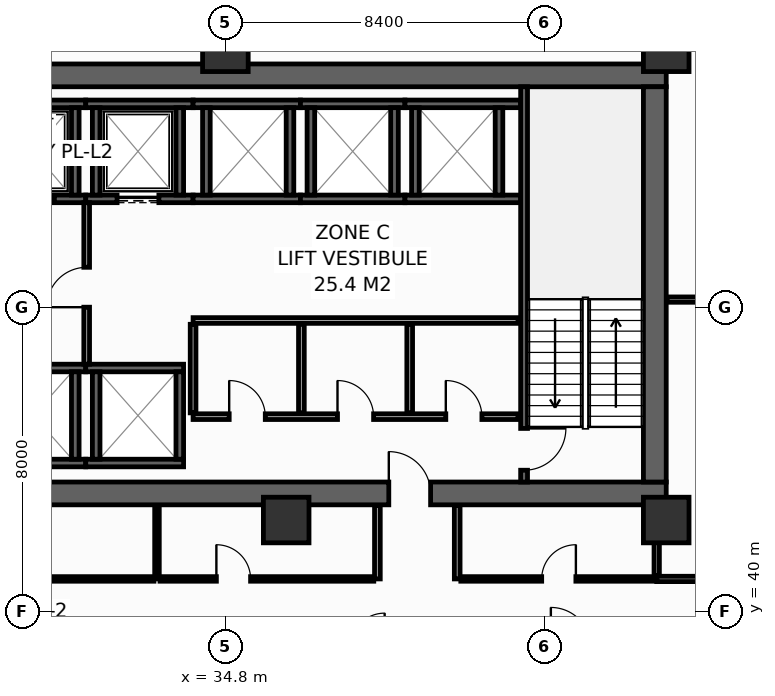
"""IFC4 building model, lengths in metres.
Left out: names, types, materials, properties, quantities, classifications, styles, units other than length and angle.
Written with IfcOpenShell. Run it as: python <this file> out.ifc"""

import sys

from ifc_helpers import new_model, si_unit, direction, frame, frame_2d, origin, origin_2d, place, context, subcontext, project, spatial, rectangle, hollow_rectangle, extrude, element, fill, save


model = new_model("IFC4")
c1 = context("Model", 3, precision=1e-05, world=origin(), true_north=direction((0.0, 1.0)))
c2 = subcontext(c1, "Body", "Model", "MODEL_VIEW")
j1 = project(units=[si_unit("LENGTHUNIT", "METRE"), si_unit("PLANEANGLEUNIT", "RADIAN")], contexts=[c1])
p1 = place(None, origin())
s1 = spatial("IfcSite", under=j1, at=p1, CompositionType="ELEMENT")
p2 = place(p1, origin())
s2 = spatial("IfcBuilding", under=s1, at=p2, CompositionType="ELEMENT")
p3 = place(p2, frame((0.0, 0.0, 73.6)))
s3 = spatial("IfcBuildingStorey", under=s2, at=p3, CompositionType="ELEMENT", Elevation=73.6)
p4 = place(p3, frame((13.5, 43.1, 0.0), z_axis=(0.0, 0.0, 1.0), x_axis=(1.0, 0.0, 0.0)))
e1 = element("IfcWall", 1, at=p4, inside=s3, PredefinedType="SHEAR", context=c2, shape_type="SweptSolid", body=[
    extrude(rectangle(XDim=32.9, YDim=0.6, at=frame_2d((16.45, 0.0))), origin(), (0.0, 0.0, 1.0), 4.15),
])
p5 = place(p4, frame((5.4, 0.0, 0.0)))
e2 = element("IfcOpeningElement", 2, at=p5, cuts=e1, PredefinedType="OPENING", context=c2, shape_type="SweptSolid", body=[
    extrude(rectangle(XDim=1.1, YDim=2.15, at=frame_2d((0.55, 1.075))), frame((0.0, 0.31, 0.0), z_axis=(0.0, -1.0, 0.0), x_axis=(1.0, 0.0, 0.0)), (0.0, 0.0, 1.0), 0.62),
])
p6 = place(p4, frame((25.6, 0.0, 0.0)))
e3 = element("IfcOpeningElement", 3, at=p6, cuts=e1, PredefinedType="OPENING", context=c2, shape_type="SweptSolid", body=[
    extrude(rectangle(XDim=1.1, YDim=2.15, at=frame_2d((0.55, 1.075))), frame((0.0, 0.31, 0.0), z_axis=(0.0, -1.0, 0.0), x_axis=(1.0, 0.0, 0.0)), (0.0, 0.0, 1.0), 0.62),
])
p7 = place(p3, frame((13.5, 54.1, 0.0), z_axis=(0.0, 0.0, 1.0), x_axis=(1.0, 0.0, 0.0)))
e4 = element("IfcWall", 4, at=p7, inside=s3, PredefinedType="SHEAR", context=c2, shape_type="SweptSolid", body=[
    extrude(rectangle(XDim=32.9, YDim=0.6, at=frame_2d((16.45, 0.0))), origin(), (0.0, 0.0, 1.0), 4.15),
])
p8 = place(p3, frame((46.1, 43.4, 0.0), z_axis=(0.0, 0.0, 1.0), x_axis=(0.0, 1.0, 0.0)))
e5 = element("IfcWall", 5, at=p8, inside=s3, PredefinedType="SHEAR", context=c2, shape_type="SweptSolid", body=[
    extrude(rectangle(XDim=10.4, YDim=0.6, at=frame_2d((5.2, 0.0))), origin(), (0.0, 0.0, 1.0), 4.15),
])
for number, where, z_axis, x_axis in (
    (6, (34.8, 54.8, 0.0), (0.0, 0.0, 1.0), (1.0, 0.0, 0.0)),
    (7, (46.4, 54.8, 0.0), (0.0, 0.0, 1.0), (1.0, 0.0, 0.0)),
    (8, (36.4, 42.4, 0.0), (0.0, 0.0, 1.0), (1.0, 0.0, 0.0)),
    (9, (46.4, 42.4, 0.0), (0.0, 0.0, 1.0), (1.0, 0.0, 0.0)),
):
    element("IfcColumn", number, at=place(p3, frame(where, z_axis=z_axis, x_axis=x_axis)), inside=s3, PredefinedType="COLUMN", context=c2, shape_type="SweptSolid", body=[
        extrude(hollow_rectangle(XDim=1.2, YDim=1.2, WallThickness=0.055, at=origin_2d()), origin(), (0.0, 0.0, 1.0), 4.4),
    ])
p9 = place(p3, frame((28.375, 50.85, 0.0), z_axis=(0.0, 0.0, 1.0), x_axis=(1.0, 0.0, 0.0)))
e10 = element("IfcWall", 10, at=p9, inside=s3, PredefinedType="SHEAR", context=c2, shape_type="SweptSolid", body=[
    extrude(rectangle(XDim=2.75, YDim=0.2, at=frame_2d((1.375, 0.0))), origin(), (0.0, 0.0, 1.0), 4.15),
])
p10 = place(p9, frame((0.825, 0.0, 0.0)))
e11 = element("IfcOpeningElement", 11, at=p10, cuts=e10, PredefinedType="OPENING", context=c2, shape_type="SweptSolid", body=[
    extrude(rectangle(XDim=1.1, YDim=2.2, at=frame_2d((0.55, 1.1))), frame((0.0, 0.11, 0.0), z_axis=(0.0, -1.0, 0.0), x_axis=(1.0, 0.0, 0.0)), (0.0, 0.0, 1.0), 0.22),
])
p11 = place(p3, frame((28.375, 53.35, 0.0), z_axis=(0.0, 0.0, 1.0), x_axis=(1.0, 0.0, 0.0)))
e12 = element("IfcWall", 12, at=p11, inside=s3, PredefinedType="SHEAR", context=c2, shape_type="SweptSolid", body=[
    extrude(rectangle(XDim=2.75, YDim=0.2, at=frame_2d((1.375, 0.0))), origin(), (0.0, 0.0, 1.0), 4.15),
])
p12 = place(p3, frame((30.85, 50.95, 0.0), z_axis=(0.0, 0.0, 1.0), x_axis=(0.0, 1.0, 0.0)))
e13 = element("IfcWall", 13, at=p12, inside=s3, PredefinedType="SHEAR", context=c2, shape_type="SweptSolid", body=[
    extrude(rectangle(XDim=2.3, YDim=0.2, at=frame_2d((1.15, 0.0))), origin(), (0.0, 0.0, 1.0), 4.15),
])
p13 = place(p3, frame((31.125, 50.85, 0.0), z_axis=(0.0, 0.0, 1.0), x_axis=(1.0, 0.0, 0.0)))
e14 = element("IfcWall", 14, at=p13, inside=s3, PredefinedType="SHEAR", context=c2, shape_type="SweptSolid", body=[
    extrude(rectangle(XDim=2.825, YDim=0.2, at=frame_2d((1.413, 0.0))), origin(), (0.0, 0.0, 1.0), 4.15),
])
p14 = place(p13, frame((0.825, 0.0, 0.0)))
e15 = element("IfcOpeningElement", 15, at=p14, cuts=e14, PredefinedType="OPENING", context=c2, shape_type="SweptSolid", body=[
    extrude(rectangle(XDim=1.1, YDim=2.2, at=frame_2d((0.55, 1.1))), frame((0.0, 0.11, 0.0), z_axis=(0.0, -1.0, 0.0), x_axis=(1.0, 0.0, 0.0)), (0.0, 0.0, 1.0), 0.22),
])
p15 = place(p3, frame((31.125, 53.35, 0.0), z_axis=(0.0, 0.0, 1.0), x_axis=(1.0, 0.0, 0.0)))
e16 = element("IfcWall", 16, at=p15, inside=s3, PredefinedType="SHEAR", context=c2, shape_type="SweptSolid", body=[
    extrude(rectangle(XDim=2.825, YDim=0.2, at=frame_2d((1.413, 0.0))), origin(), (0.0, 0.0, 1.0), 4.15),
])
for number, where, z_axis, x_axis in (
    (17, (31.4, 50.95, 0.0), (0.0, 0.0, 1.0), (0.0, 1.0, 0.0)),
    (18, (33.6, 50.95, 0.0), (0.0, 0.0, 1.0), (0.0, 1.0, 0.0)),
):
    element("IfcWall", number, at=place(p3, frame(where, z_axis=z_axis, x_axis=x_axis)), inside=s3, PredefinedType="SHEAR", context=c2, shape_type="SweptSolid", body=[
        extrude(rectangle(XDim=2.3, YDim=0.2, at=frame_2d((1.15, 0.0))), origin(), (0.0, 0.0, 1.0), 4.15),
    ])
for number, where, z_axis, x_axis in (
    (19, (28.375, 43.9, 0.0), (0.0, 0.0, 1.0), (1.0, 0.0, 0.0)),
    (20, (28.375, 46.4, 0.0), (0.0, 0.0, 1.0), (1.0, 0.0, 0.0)),
):
    element("IfcWall", number, at=place(p3, frame(where, z_axis=z_axis, x_axis=x_axis)), inside=s3, PredefinedType="SHEAR", context=c2, shape_type="SweptSolid", body=[
        extrude(rectangle(XDim=2.75, YDim=0.2, at=frame_2d((1.375, 0.0))), origin(), (0.0, 0.0, 1.0), 4.15),
    ])
p16 = place(p3, frame((30.85, 44.0, 0.0), z_axis=(0.0, 0.0, 1.0), x_axis=(0.0, 1.0, 0.0)))
e21 = element("IfcWall", 21, at=p16, inside=s3, PredefinedType="SHEAR", context=c2, shape_type="SweptSolid", body=[
    extrude(rectangle(XDim=2.3, YDim=0.2, at=frame_2d((1.15, 0.0))), origin(), (0.0, 0.0, 1.0), 4.15),
])
for number, where, z_axis, x_axis in (
    (22, (31.125, 43.9, 0.0), (0.0, 0.0, 1.0), (1.0, 0.0, 0.0)),
    (23, (31.125, 46.4, 0.0), (0.0, 0.0, 1.0), (1.0, 0.0, 0.0)),
):
    element("IfcWall", number, at=place(p3, frame(where, z_axis=z_axis, x_axis=x_axis)), inside=s3, PredefinedType="SHEAR", context=c2, shape_type="SweptSolid", body=[
        extrude(rectangle(XDim=2.575, YDim=0.2, at=frame_2d((1.288, 0.0))), origin(), (0.0, 0.0, 1.0), 4.15),
    ])
for number, where, z_axis, x_axis in (
    (24, (31.4, 44.0, 0.0), (0.0, 0.0, 1.0), (0.0, 1.0, 0.0)),
    (25, (33.6, 44.0, 0.0), (0.0, 0.0, 1.0), (0.0, 1.0, 0.0)),
):
    element("IfcWall", number, at=place(p3, frame(where, z_axis=z_axis, x_axis=x_axis)), inside=s3, PredefinedType="SHEAR", context=c2, shape_type="SweptSolid", body=[
        extrude(rectangle(XDim=2.3, YDim=0.2, at=frame_2d((1.15, 0.0))), origin(), (0.0, 0.0, 1.0), 4.15),
    ])
for number, where, z_axis, x_axis in (
    (26, (33.95, 50.85, 0.0), (0.0, 0.0, 1.0), (1.0, 0.0, 0.0)),
    (27, (33.95, 53.35, 0.0), (0.0, 0.0, 1.0), (1.0, 0.0, 0.0)),
):
    element("IfcWall", number, at=place(p3, frame(where, z_axis=z_axis, x_axis=x_axis)), inside=s3, PredefinedType="SHEAR", context=c2, shape_type="SweptSolid", body=[
        extrude(rectangle(XDim=2.825, YDim=0.2, at=frame_2d((1.413, 0.0))), origin(), (0.0, 0.0, 1.0), 4.15),
    ])
for number, where, z_axis, x_axis in (
    (28, (34.3, 50.95, 0.0), (0.0, 0.0, 1.0), (0.0, 1.0, 0.0)),
    (29, (36.5, 50.95, 0.0), (0.0, 0.0, 1.0), (0.0, 1.0, 0.0)),
):
    element("IfcWall", number, at=place(p3, frame(where, z_axis=z_axis, x_axis=x_axis)), inside=s3, PredefinedType="SHEAR", context=c2, shape_type="SweptSolid", body=[
        extrude(rectangle(XDim=2.3, YDim=0.2, at=frame_2d((1.15, 0.0))), origin(), (0.0, 0.0, 1.0), 4.15),
    ])
for number, where, z_axis, x_axis in (
    (30, (36.775, 50.85, 0.0), (0.0, 0.0, 1.0), (1.0, 0.0, 0.0)),
    (31, (36.775, 53.35, 0.0), (0.0, 0.0, 1.0), (1.0, 0.0, 0.0)),
):
    element("IfcWall", number, at=place(p3, frame(where, z_axis=z_axis, x_axis=x_axis)), inside=s3, PredefinedType="SHEAR", context=c2, shape_type="SweptSolid", body=[
        extrude(rectangle(XDim=2.75, YDim=0.2, at=frame_2d((1.375, 0.0))), origin(), (0.0, 0.0, 1.0), 4.15),
    ])
for number, where, z_axis, x_axis in (
    (32, (37.05, 50.95, 0.0), (0.0, 0.0, 1.0), (0.0, 1.0, 0.0)),
    (33, (39.25, 50.95, 0.0), (0.0, 0.0, 1.0), (0.0, 1.0, 0.0)),
):
    element("IfcWall", number, at=place(p3, frame(where, z_axis=z_axis, x_axis=x_axis)), inside=s3, PredefinedType="SHEAR", context=c2, shape_type="SweptSolid", body=[
        extrude(rectangle(XDim=2.3, YDim=0.2, at=frame_2d((1.15, 0.0))), origin(), (0.0, 0.0, 1.0), 4.15),
    ])
for number, where, z_axis, x_axis in (
    (34, (39.525, 50.85, 0.0), (0.0, 0.0, 1.0), (1.0, 0.0, 0.0)),
    (35, (39.525, 53.35, 0.0), (0.0, 0.0, 1.0), (1.0, 0.0, 0.0)),
):
    element("IfcWall", number, at=place(p3, frame(where, z_axis=z_axis, x_axis=x_axis)), inside=s3, PredefinedType="SHEAR", context=c2, shape_type="SweptSolid", body=[
        extrude(rectangle(XDim=3.045, YDim=0.2, at=frame_2d((1.522, 0.0))), origin(), (0.0, 0.0, 1.0), 4.15),
    ])
for number, where, z_axis, x_axis in (
    (36, (39.8, 50.95, 0.0), (0.0, 0.0, 1.0), (0.0, 1.0, 0.0)),
    (37, (42.0, 50.95, 0.0), (0.0, 0.0, 1.0), (0.0, 1.0, 0.0)),
):
    element("IfcWall", number, at=place(p3, frame(where, z_axis=z_axis, x_axis=x_axis)), inside=s3, PredefinedType="SHEAR", context=c2, shape_type="SweptSolid", body=[
        extrude(rectangle(XDim=2.3, YDim=0.2, at=frame_2d((1.15, 0.0))), origin(), (0.0, 0.0, 1.0), 4.15),
    ])
p17 = place(p3, frame((42.66, 53.8, 0.0), z_axis=(0.0, 0.0, 1.0), x_axis=(0.0, -1.0, 0.0)))
e38 = element("IfcWall", 38, at=p17, inside=s3, PredefinedType="SHEAR", context=c2, shape_type="SweptSolid", body=[
    extrude(rectangle(XDim=10.4, YDim=0.18, at=frame_2d((5.2, 0.0))), origin(), (0.0, 0.0, 1.0), 4.15),
])
p18 = place(p17, frame((8.99, 0.0, 0.0)))
e39 = element("IfcOpeningElement", 39, at=p18, cuts=e38, PredefinedType="OPENING", context=c2, shape_type="SweptSolid", body=[
    extrude(rectangle(XDim=1.1, YDim=2.15, at=frame_2d((0.55, 1.075))), frame((0.0, 0.1, 0.0), z_axis=(0.0, -1.0, 0.0), x_axis=(1.0, 0.0, 0.0)), (0.0, 0.0, 1.0), 0.2),
])
p19 = place(p3, frame((31.15, 46.5, 0.0), z_axis=(0.0, 0.0, 1.0), x_axis=(0.0, 1.0, 0.0)))
e40 = element("IfcWall", 40, at=p19, inside=s3, PredefinedType="PARTITIONING", context=c2, shape_type="SweptSolid", body=[
    extrude(rectangle(XDim=4.25, YDim=0.15, at=frame_2d((2.125, 0.0))), origin(), (0.0, 0.0, 1.0), 4.15),
])
p20 = place(p19, frame((1.5, 0.0, 0.0)))
e41 = element("IfcOpeningElement", 41, at=p20, cuts=e40, PredefinedType="OPENING", context=c2, shape_type="SweptSolid", body=[
    extrude(rectangle(XDim=1.05, YDim=2.15, at=frame_2d((0.525, 1.075))), frame((0.0, 0.085, 0.0), z_axis=(0.0, -1.0, 0.0), x_axis=(1.0, 0.0, 0.0)), (0.0, 0.0, 1.0), 0.17),
])
p21 = place(p3, frame((33.95, 45.12, 0.0), z_axis=(0.0, 0.0, 1.0), x_axis=(1.0, 0.0, 0.0)))
e42 = element("IfcWall", 42, at=p21, inside=s3, PredefinedType="PARTITIONING", context=c2, shape_type="SweptSolid", body=[
    extrude(rectangle(XDim=8.55, YDim=0.15, at=frame_2d((4.275, 0.0))), origin(), (0.0, 0.0, 1.0), 4.15),
])
p22 = place(p21, frame((0.95, 0.0, 0.0)))
e43 = element("IfcOpeningElement", 43, at=p22, cuts=e42, PredefinedType="OPENING", context=c2, shape_type="SweptSolid", body=[
    extrude(rectangle(XDim=0.95, YDim=2.15, at=frame_2d((0.475, 1.075))), frame((0.0, 0.085, 0.0), z_axis=(0.0, -1.0, 0.0), x_axis=(1.0, 0.0, 0.0)), (0.0, 0.0, 1.0), 0.17),
])
p23 = place(p21, frame((3.8, 0.0, 0.0)))
e44 = element("IfcOpeningElement", 44, at=p23, cuts=e42, PredefinedType="OPENING", context=c2, shape_type="SweptSolid", body=[
    extrude(rectangle(XDim=0.95, YDim=2.15, at=frame_2d((0.475, 1.075))), frame((0.0, 0.085, 0.0), z_axis=(0.0, -1.0, 0.0), x_axis=(1.0, 0.0, 0.0)), (0.0, 0.0, 1.0), 0.17),
])
p24 = place(p21, frame((6.65, 0.0, 0.0)))
e45 = element("IfcOpeningElement", 45, at=p24, cuts=e42, PredefinedType="OPENING", context=c2, shape_type="SweptSolid", body=[
    extrude(rectangle(XDim=0.95, YDim=2.15, at=frame_2d((0.475, 1.075))), frame((0.0, 0.085, 0.0), z_axis=(0.0, -1.0, 0.0), x_axis=(1.0, 0.0, 0.0)), (0.0, 0.0, 1.0), 0.17),
])
p25 = place(p3, frame((33.95, 47.65, 0.0), z_axis=(0.0, 0.0, 1.0), x_axis=(1.0, 0.0, 0.0)))
e46 = element("IfcWall", 46, at=p25, inside=s3, PredefinedType="PARTITIONING", context=c2, shape_type="SweptSolid", body=[
    extrude(rectangle(XDim=8.55, YDim=0.15, at=frame_2d((4.275, 0.0))), origin(), (0.0, 0.0, 1.0), 4.15),
])
for number, where, z_axis, x_axis in (
    (47, (33.95, 45.22, 0.0), (0.0, 0.0, 1.0), (0.0, 1.0, 0.0)),
    (48, (36.8, 45.22, 0.0), (0.0, 0.0, 1.0), (0.0, 1.0, 0.0)),
    (49, (39.65, 45.22, 0.0), (0.0, 0.0, 1.0), (0.0, 1.0, 0.0)),
):
    element("IfcWall", number, at=place(p3, frame(where, z_axis=z_axis, x_axis=x_axis)), inside=s3, PredefinedType="PARTITIONING", context=c2, shape_type="SweptSolid", body=[
        extrude(rectangle(XDim=2.33, YDim=0.15, at=frame_2d((1.165, 0.0))), origin(), (0.0, 0.0, 1.0), 4.15),
    ])
p26 = place(p3, frame((46.15, 40.85, 0.0), z_axis=(0.0, 0.0, 1.0), x_axis=(1.0, 0.0, 0.0)))
e50 = element("IfcWall", 50, at=p26, inside=s3, PredefinedType="PARTITIONING", context=c2, shape_type="SweptSolid", body=[
    extrude(rectangle(XDim=4.05, YDim=0.14, at=frame_2d((2.025, 0.0))), origin(), (0.0, 0.0, 1.0), 4.15),
])
p27 = place(p3, frame((46.15, 40.94, 0.0), z_axis=(0.0, 0.0, 1.0), x_axis=(0.0, 1.0, 0.0)))
e51 = element("IfcWall", 51, at=p27, inside=s3, PredefinedType="PARTITIONING", context=c2, shape_type="SweptSolid", body=[
    extrude(rectangle(XDim=1.84, YDim=0.14, at=frame_2d((0.92, 0.0))), origin(), (0.0, 0.0, 1.0), 4.15),
])
p28 = place(p3, frame((46.42, 48.2, 0.0), z_axis=(0.0, 0.0, 1.0), x_axis=(1.0, 0.0, 0.0)))
e52 = element("IfcWall", 52, at=p28, inside=s3, PredefinedType="PARTITIONING", context=c2, shape_type="SweptSolid", body=[
    extrude(rectangle(XDim=3.78, YDim=0.14, at=frame_2d((1.89, 0.0))), origin(), (0.0, 0.0, 1.0), 4.15),
])
for number, where, z_axis, x_axis in (
    (53, (38.8, 40.85, 0.0), (0.0, 0.0, 1.0), (0.0, 1.0, 0.0)),
    (54, (40.9, 40.85, 0.0), (0.0, 0.0, 1.0), (0.0, 1.0, 0.0)),
):
    element("IfcWall", number, at=place(p3, frame(where, z_axis=z_axis, x_axis=x_axis)), inside=s3, PredefinedType="PARTITIONING", context=c2, shape_type="SweptSolid", body=[
        extrude(rectangle(XDim=1.93, YDim=0.15, at=frame_2d((0.965, 0.0))), origin(), (0.0, 0.0, 1.0), 4.15),
    ])
p29 = place(p3, frame((33.0, 40.85, 0.0), z_axis=(0.0, 0.0, 1.0), x_axis=(0.0, 1.0, 0.0)))
e55 = element("IfcWall", 55, at=p29, inside=s3, PredefinedType="PARTITIONING", context=c2, shape_type="SweptSolid", body=[
    extrude(rectangle(XDim=1.93, YDim=0.12, at=frame_2d((0.965, 0.0))), origin(), (0.0, 0.0, 1.0), 3.335),
])
p30 = place(p3, frame((20.795, 40.85, 0.0), z_axis=(0.0, 0.0, 1.0), x_axis=(1.0, 0.0, 0.0)))
e56 = element("IfcWall", 56, at=p30, inside=s3, PredefinedType="PARTITIONING", context=c2, shape_type="SweptSolid", body=[
    extrude(rectangle(XDim=12.125, YDim=0.12, at=frame_2d((6.062, 0.0))), origin(), (0.0, 0.0, 1.0), 3.335),
])
p31 = place(p30, frame((5.612, 0.0, 0.0)))
e57 = element("IfcOpeningElement", 57, at=p31, cuts=e56, PredefinedType="OPENING", context=c2, shape_type="SweptSolid", body=[
    extrude(rectangle(XDim=0.9, YDim=2.1, at=frame_2d((0.45, 1.05))), frame((0.0, 0.07, 0.0), z_axis=(0.0, -1.0, 0.0), x_axis=(1.0, 0.0, 0.0)), (0.0, 0.0, 1.0), 0.14),
])
p32 = place(p3, frame((33.08, 40.85, 0.0), z_axis=(0.0, 0.0, 1.0), x_axis=(1.0, 0.0, 0.0)))
e58 = element("IfcWall", 58, at=p32, inside=s3, PredefinedType="PARTITIONING", context=c2, shape_type="SweptSolid", body=[
    extrude(rectangle(XDim=5.625, YDim=0.12, at=frame_2d((2.812, 0.0))), origin(), (0.0, 0.0, 1.0), 3.335),
])
p33 = place(p32, frame((1.483, 0.0, 0.0)))
e59 = element("IfcOpeningElement", 59, at=p33, cuts=e58, PredefinedType="OPENING", context=c2, shape_type="SweptSolid", body=[
    extrude(rectangle(XDim=0.9, YDim=2.1, at=frame_2d((0.45, 1.05))), frame((0.0, 0.07, 0.0), z_axis=(0.0, -1.0, 0.0), x_axis=(1.0, 0.0, 0.0)), (0.0, 0.0, 1.0), 0.14),
])
p34 = place(p3, frame((40.995, 40.85, 0.0), z_axis=(0.0, 0.0, 1.0), x_axis=(1.0, 0.0, 0.0)))
e60 = element("IfcWall", 60, at=p34, inside=s3, PredefinedType="PARTITIONING", context=c2, shape_type="SweptSolid", body=[
    extrude(rectangle(XDim=5.155, YDim=0.12, at=frame_2d((2.577, 0.0))), origin(), (0.0, 0.0, 1.0), 4.15),
])
p35 = place(p34, frame((2.128, 0.0, 0.0)))
e61 = element("IfcOpeningElement", 61, at=p35, cuts=e60, PredefinedType="OPENING", context=c2, shape_type="SweptSolid", body=[
    extrude(rectangle(XDim=0.9, YDim=2.1, at=frame_2d((0.45, 1.05))), frame((0.0, 0.07, 0.0), z_axis=(0.0, -1.0, 0.0), x_axis=(1.0, 0.0, 0.0)), (0.0, 0.0, 1.0), 0.14),
])
p36 = place(p10, origin())
e62 = element("IfcDoor", 62, at=p36, inside=s3, OperationType="SLIDING_TO_LEFT", PredefinedType="DOOR", context=c2, shape_type="SweptSolid", body=[
    extrude(rectangle(XDim=1.1, YDim=2.2, at=frame_2d((0.55, 1.1))), frame((0.0, 0.025, 0.0), z_axis=(0.0, -1.0, 0.0), x_axis=(1.0, 0.0, 0.0)), (0.0, 0.0, 1.0), 0.05),
])
fill(e11, e62)
p37 = place(p14, origin())
e63 = element("IfcDoor", 63, at=p37, inside=s3, OperationType="SLIDING_TO_LEFT", PredefinedType="DOOR", context=c2, shape_type="SweptSolid", body=[
    extrude(rectangle(XDim=1.1, YDim=2.2, at=frame_2d((0.55, 1.1))), frame((0.0, 0.025, 0.0), z_axis=(0.0, -1.0, 0.0), x_axis=(1.0, 0.0, 0.0)), (0.0, 0.0, 1.0), 0.05),
])
fill(e15, e63)
p38 = place(p18, origin())
e64 = element("IfcDoor", 64, at=p38, inside=s3, OperationType="SINGLE_SWING_LEFT", PredefinedType="DOOR", context=c2, shape_type="SweptSolid", body=[
    extrude(rectangle(XDim=1.1, YDim=2.15, at=frame_2d((0.55, 1.075))), frame((0.0, 0.025, 0.0), z_axis=(0.0, -1.0, 0.0), x_axis=(1.0, 0.0, 0.0)), (0.0, 0.0, 1.0), 0.05),
])
fill(e39, e64)
p39 = place(p6, origin())
e65 = element("IfcDoor", 65, at=p39, inside=s3, OperationType="SINGLE_SWING_LEFT", PredefinedType="DOOR", context=c2, shape_type="SweptSolid", body=[
    extrude(rectangle(XDim=1.1, YDim=2.15, at=frame_2d((0.55, 1.075))), frame((0.0, 0.025, 0.0), z_axis=(0.0, -1.0, 0.0), x_axis=(1.0, 0.0, 0.0)), (0.0, 0.0, 1.0), 0.05),
])
fill(e3, e65)
p40 = place(p20, origin())
e66 = element("IfcDoor", 66, at=p40, inside=s3, OperationType="SINGLE_SWING_LEFT", PredefinedType="DOOR", context=c2, shape_type="SweptSolid", body=[
    extrude(rectangle(XDim=1.05, YDim=2.15, at=frame_2d((0.525, 1.075))), frame((0.0, 0.025, 0.0), z_axis=(0.0, -1.0, 0.0), x_axis=(1.0, 0.0, 0.0)), (0.0, 0.0, 1.0), 0.05),
])
fill(e41, e66)
p41 = place(p22, origin())
e67 = element("IfcDoor", 67, at=p41, inside=s3, OperationType="SINGLE_SWING_LEFT", PredefinedType="DOOR", context=c2, shape_type="SweptSolid", body=[
    extrude(rectangle(XDim=0.95, YDim=2.15, at=frame_2d((0.475, 1.075))), frame((0.0, 0.025, 0.0), z_axis=(0.0, -1.0, 0.0), x_axis=(1.0, 0.0, 0.0)), (0.0, 0.0, 1.0), 0.05),
])
fill(e43, e67)
p42 = place(p23, origin())
e68 = element("IfcDoor", 68, at=p42, inside=s3, OperationType="SINGLE_SWING_LEFT", PredefinedType="DOOR", context=c2, shape_type="SweptSolid", body=[
    extrude(rectangle(XDim=0.95, YDim=2.15, at=frame_2d((0.475, 1.075))), frame((0.0, 0.025, 0.0), z_axis=(0.0, -1.0, 0.0), x_axis=(1.0, 0.0, 0.0)), (0.0, 0.0, 1.0), 0.05),
])
fill(e44, e68)
p43 = place(p24, origin())
e69 = element("IfcDoor", 69, at=p43, inside=s3, OperationType="SINGLE_SWING_LEFT", PredefinedType="DOOR", context=c2, shape_type="SweptSolid", body=[
    extrude(rectangle(XDim=0.95, YDim=2.15, at=frame_2d((0.475, 1.075))), frame((0.0, 0.025, 0.0), z_axis=(0.0, -1.0, 0.0), x_axis=(1.0, 0.0, 0.0)), (0.0, 0.0, 1.0), 0.05),
])
fill(e45, e69)
p44 = place(p33, origin())
e70 = element("IfcDoor", 70, at=p44, inside=s3, OperationType="SINGLE_SWING_LEFT", PredefinedType="DOOR", context=c2, shape_type="SweptSolid", body=[
    extrude(rectangle(XDim=0.9, YDim=2.1, at=frame_2d((0.45, 1.05))), frame((0.0, 0.025, 0.0), z_axis=(0.0, -1.0, 0.0), x_axis=(1.0, 0.0, 0.0)), (0.0, 0.0, 1.0), 0.05),
])
fill(e59, e70)
p45 = place(p35, origin())
e71 = element("IfcDoor", 71, at=p45, inside=s3, OperationType="SINGLE_SWING_RIGHT", PredefinedType="DOOR", context=c2, shape_type="SweptSolid", body=[
    extrude(rectangle(XDim=0.9, YDim=2.1, at=frame_2d((0.45, 1.05))), frame((0.0, 0.025, 0.0), z_axis=(0.0, -1.0, 0.0), x_axis=(1.0, 0.0, 0.0)), (0.0, 0.0, 1.0), 0.05),
])
fill(e61, e71)
save(model, sys.argv[1])
